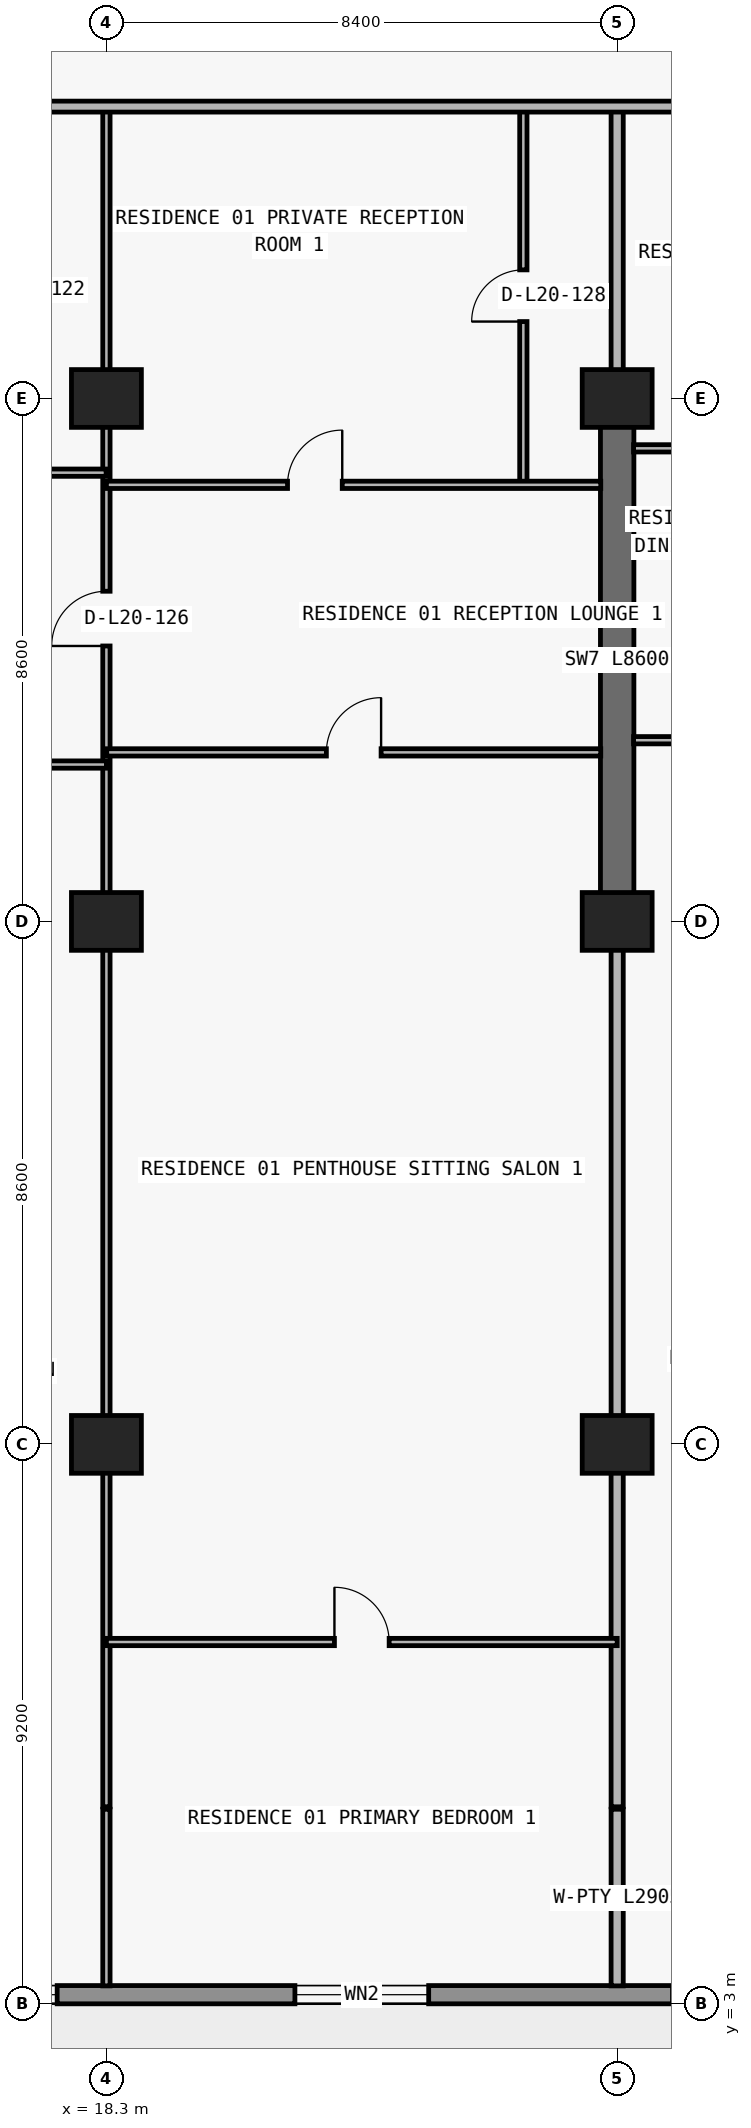
"""IFC4 building model, lengths in metres.
Left out: names, types, materials, properties, quantities, classifications, styles, units other than length and angle.
Written with IfcOpenShell. Run it as: python <this file> out.ifc"""

import sys

from ifc_helpers import new_model, si_unit, direction, frame, frame_2d, origin, origin_2d, place, context, subcontext, project, spatial, rectangle, extrude, element, fill, save


model = new_model("IFC4")
c1 = context("Model", 3, precision=1e-05, world=origin(), true_north=direction((0.0, 1.0)))
c2 = subcontext(c1, "Body", "Model", "MODEL_VIEW")
j1 = project(units=[si_unit("LENGTHUNIT", "METRE"), si_unit("PLANEANGLEUNIT", "RADIAN")], contexts=[c1])
p1 = place(None, origin())
s1 = spatial("IfcSite", under=j1, at=p1, CompositionType="ELEMENT")
p2 = place(p1, origin())
s2 = spatial("IfcBuilding", under=s1, at=p2, CompositionType="ELEMENT")
p3 = place(p2, frame((0.0, 0.0, 76.2)))
s3 = spatial("IfcBuildingStorey", under=s2, at=p3, CompositionType="ELEMENT", Elevation=76.2)
for number, where, z_axis, x_axis in (
    (1, (18.3, 12.2, 0.0), (0.0, 0.0, 1.0), (1.0, 0.0, 0.0)),
    (2, (26.7, 12.2, 0.0), (0.0, 0.0, 1.0), (1.0, 0.0, 0.0)),
    (3, (18.3, 20.8, 0.0), (0.0, 0.0, 1.0), (1.0, 0.0, 0.0)),
    (4, (26.7, 20.8, 0.0), (0.0, 0.0, 1.0), (1.0, 0.0, 0.0)),
    (5, (18.3, 29.4, 0.0), (0.0, 0.0, 1.0), (1.0, 0.0, 0.0)),
    (6, (26.7, 29.4, 0.0), (0.0, 0.0, 1.0), (1.0, 0.0, 0.0)),
):
    element("IfcColumn", number, at=place(p3, frame(where, z_axis=z_axis, x_axis=x_axis)), inside=s3, PredefinedType="COLUMN", context=c2, shape_type="SweptSolid", body=[
        extrude(rectangle(XDim=1.15, YDim=0.95, at=origin_2d()), origin(), (0.0, 0.0, 1.0), 3.0),
    ])
p4 = place(p3, frame((26.7, 20.8, 0.0), z_axis=(0.0, 0.0, 1.0), x_axis=(0.0, 1.0, 0.0)))
e7 = element("IfcWall", 7, at=p4, inside=s3, PredefinedType="SHEAR", context=c2, shape_type="SweptSolid", body=[
    extrude(rectangle(XDim=8.6, YDim=0.55, at=frame_2d((4.3, 0.0))), origin(), (0.0, 0.0, 1.0), 3.0),
])
p5 = place(p3, frame((72.7, 3.15, 0.0), z_axis=(0.0, 0.0, 1.0), x_axis=(-1.0, 0.0, 0.0)))
e8 = element("IfcWall", 8, at=p5, inside=s3, PredefinedType="STANDARD", context=c2, shape_type="SweptSolid", body=[
    extrude(rectangle(XDim=67.6, YDim=0.3, at=frame_2d((33.8, 0.0))), origin(), (0.0, 0.0, 1.0), 3.0),
])
p6 = place(p5, frame((59.89, 0.0, 0.0)))
e9 = element("IfcOpeningElement", 9, at=p6, cuts=e8, PredefinedType="OPENING", context=c2, shape_type="SweptSolid", body=[
    extrude(rectangle(XDim=2.0, YDim=2.3, at=frame_2d((1.0, 1.15))), frame((0.0, 0.16, 0.0), z_axis=(0.0, -1.0, 0.0), x_axis=(1.0, 0.0, 0.0)), (0.0, 0.0, 1.0), 0.32),
])
p7 = place(p5, frame((55.21, 0.0, 0.65)))
e10 = element("IfcOpeningElement", 10, at=p7, cuts=e8, PredefinedType="OPENING", context=c2, shape_type="SweptSolid", body=[
    extrude(rectangle(XDim=2.6, YDim=1.85, at=frame_2d((1.3, 0.925))), frame((0.0, 0.16, 0.0), z_axis=(0.0, -1.0, 0.0), x_axis=(1.0, 0.0, 0.0)), (0.0, 0.0, 1.0), 0.32),
])
p8 = place(p5, frame((49.1, 0.0, 0.85)))
e11 = element("IfcOpeningElement", 11, at=p8, cuts=e8, PredefinedType="OPENING", context=c2, shape_type="SweptSolid", body=[
    extrude(rectangle(XDim=2.2, YDim=1.55, at=frame_2d((1.1, 0.775))), frame((0.0, 0.16, 0.0), z_axis=(0.0, -1.0, 0.0), x_axis=(1.0, 0.0, 0.0)), (0.0, 0.0, 1.0), 0.32),
])
p9 = place(p5, frame((43.09, 0.0, 0.0)))
e12 = element("IfcOpeningElement", 12, at=p9, cuts=e8, PredefinedType="OPENING", context=c2, shape_type="SweptSolid", body=[
    extrude(rectangle(XDim=2.0, YDim=2.3, at=frame_2d((1.0, 1.15))), frame((0.0, 0.16, 0.0), z_axis=(0.0, -1.0, 0.0), x_axis=(1.0, 0.0, 0.0)), (0.0, 0.0, 1.0), 0.32),
])
p10 = place(p5, frame((38.41, 0.0, 0.65)))
e13 = element("IfcOpeningElement", 13, at=p10, cuts=e8, PredefinedType="OPENING", context=c2, shape_type="SweptSolid", body=[
    extrude(rectangle(XDim=2.6, YDim=1.85, at=frame_2d((1.3, 0.925))), frame((0.0, 0.16, 0.0), z_axis=(0.0, -1.0, 0.0), x_axis=(1.0, 0.0, 0.0)), (0.0, 0.0, 1.0), 0.32),
])
p11 = place(p5, frame((32.7, 0.0, 0.85)))
e14 = element("IfcOpeningElement", 14, at=p11, cuts=e8, PredefinedType="OPENING", context=c2, shape_type="SweptSolid", body=[
    extrude(rectangle(XDim=2.2, YDim=1.55, at=frame_2d((1.1, 0.775))), frame((0.0, 0.16, 0.0), z_axis=(0.0, -1.0, 0.0), x_axis=(1.0, 0.0, 0.0)), (0.0, 0.0, 1.0), 0.32),
])
p12 = place(p5, frame((24.7, 0.0, 0.85)))
e15 = element("IfcOpeningElement", 15, at=p12, cuts=e8, PredefinedType="OPENING", context=c2, shape_type="SweptSolid", body=[
    extrude(rectangle(XDim=2.2, YDim=1.55, at=frame_2d((1.1, 0.775))), frame((0.0, 0.16, 0.0), z_axis=(0.0, -1.0, 0.0), x_axis=(1.0, 0.0, 0.0)), (0.0, 0.0, 1.0), 0.32),
])
p13 = place(p5, frame((18.69, 0.0, 0.0)))
e16 = element("IfcOpeningElement", 16, at=p13, cuts=e8, PredefinedType="OPENING", context=c2, shape_type="SweptSolid", body=[
    extrude(rectangle(XDim=2.0, YDim=2.3, at=frame_2d((1.0, 1.15))), frame((0.0, 0.16, 0.0), z_axis=(0.0, -1.0, 0.0), x_axis=(1.0, 0.0, 0.0)), (0.0, 0.0, 1.0), 0.32),
])
p14 = place(p5, frame((14.01, 0.0, 0.65)))
e17 = element("IfcOpeningElement", 17, at=p14, cuts=e8, PredefinedType="OPENING", context=c2, shape_type="SweptSolid", body=[
    extrude(rectangle(XDim=2.6, YDim=1.85, at=frame_2d((1.3, 0.925))), frame((0.0, 0.16, 0.0), z_axis=(0.0, -1.0, 0.0), x_axis=(1.0, 0.0, 0.0)), (0.0, 0.0, 1.0), 0.32),
])
p15 = place(p5, frame((7.9, 0.0, 0.85)))
e18 = element("IfcOpeningElement", 18, at=p15, cuts=e8, PredefinedType="OPENING", context=c2, shape_type="SweptSolid", body=[
    extrude(rectangle(XDim=2.2, YDim=1.55, at=frame_2d((1.1, 0.775))), frame((0.0, 0.16, 0.0), z_axis=(0.0, -1.0, 0.0), x_axis=(1.0, 0.0, 0.0)), (0.0, 0.0, 1.0), 0.32),
])
p16 = place(p3, frame((18.3, 3.295, 0.0), z_axis=(0.0, 0.0, 1.0), x_axis=(0.0, 1.0, 0.0)))
e19 = element("IfcWall", 19, at=p16, inside=s3, PredefinedType="PARTITIONING", context=c2, shape_type="SweptSolid", body=[
    extrude(rectangle(XDim=2.905, YDim=0.12, at=frame_2d((1.453, 0.0))), origin(), (0.0, 0.0, 1.0), 3.0),
])
p17 = place(p3, frame((18.3, 6.24, 0.0), z_axis=(0.0, 0.0, 1.0), x_axis=(0.0, 1.0, 0.0)))
e20 = element("IfcWall", 20, at=p17, inside=s3, PredefinedType="PARTITIONING", context=c2, shape_type="SweptSolid", body=[
    extrude(rectangle(XDim=27.96, YDim=0.12, at=frame_2d((13.98, 0.0))), origin(), (0.0, 0.0, 1.0), 2.06),
])
p18 = place(p17, frame((19.09, 0.0, 0.0)))
e21 = element("IfcOpeningElement", 21, at=p18, cuts=e20, PredefinedType="OPENING", context=c2, shape_type="SweptSolid", body=[
    extrude(rectangle(XDim=0.9, YDim=2.01, at=frame_2d((0.45, 1.005))), frame((0.0, 0.07, 0.0), z_axis=(0.0, -1.0, 0.0), x_axis=(1.0, 0.0, 0.0)), (0.0, 0.0, 1.0), 0.14),
])
p19 = place(p3, frame((25.157, 27.98, 0.0), z_axis=(0.0, 0.0, 1.0), x_axis=(0.0, 1.0, 0.0)))
e22 = element("IfcWall", 22, at=p19, inside=s3, PredefinedType="PARTITIONING", context=c2, shape_type="SweptSolid", body=[
    extrude(rectangle(XDim=6.22, YDim=0.12, at=frame_2d((3.11, 0.0))), origin(), (0.0, 0.0, 1.0), 3.0),
])
p20 = place(p19, frame((2.685, 0.0, 0.0)))
e23 = element("IfcOpeningElement", 23, at=p20, cuts=e22, PredefinedType="OPENING", context=c2, shape_type="SweptSolid", body=[
    extrude(rectangle(XDim=0.85, YDim=2.1, at=frame_2d((0.425, 1.05))), frame((0.0, 0.07, 0.0), z_axis=(0.0, -1.0, 0.0), x_axis=(1.0, 0.0, 0.0)), (0.0, 0.0, 1.0), 0.14),
])
p21 = place(p3, frame((26.7, 3.295, 0.0), z_axis=(0.0, 0.0, 1.0), x_axis=(0.0, 1.0, 0.0)))
e24 = element("IfcWall", 24, at=p21, inside=s3, PredefinedType="PARTITIONING", context=c2, shape_type="SweptSolid", body=[
    extrude(rectangle(XDim=2.905, YDim=0.2, at=frame_2d((1.453, 0.0))), origin(), (0.0, 0.0, 1.0), 3.0),
])
p22 = place(p3, frame((26.7, 6.24, 0.0), z_axis=(0.0, 0.0, 1.0), x_axis=(0.0, 1.0, 0.0)))
e25 = element("IfcWall", 25, at=p22, inside=s3, PredefinedType="PARTITIONING", context=c2, shape_type="SweptSolid", body=[
    extrude(rectangle(XDim=14.555, YDim=0.2, at=frame_2d((7.277, 0.0))), origin(), (0.0, 0.0, 1.0), 2.06),
])
p23 = place(p3, frame((26.7, 29.405, 0.0), z_axis=(0.0, 0.0, 1.0), x_axis=(0.0, 1.0, 0.0)))
e26 = element("IfcWall", 26, at=p23, inside=s3, PredefinedType="PARTITIONING", context=c2, shape_type="SweptSolid", body=[
    extrude(rectangle(XDim=4.795, YDim=0.2, at=frame_2d((2.397, 0.0))), origin(), (0.0, 0.0, 1.0), 2.285),
])
p24 = place(p3, frame((18.3, 8.95, 0.0), z_axis=(0.0, 0.0, 1.0), x_axis=(1.0, 0.0, 0.0)))
e27 = element("IfcWall", 27, at=p24, inside=s3, PredefinedType="PARTITIONING", context=c2, shape_type="SweptSolid", body=[
    extrude(rectangle(XDim=8.4, YDim=0.12, at=frame_2d((4.2, 0.0))), origin(), (0.0, 0.0, 1.0), 3.0),
])
p25 = place(p24, frame((3.75, 0.0, 0.0)))
e28 = element("IfcOpeningElement", 28, at=p25, cuts=e27, PredefinedType="OPENING", context=c2, shape_type="SweptSolid", body=[
    extrude(rectangle(XDim=0.9, YDim=2.15, at=frame_2d((0.45, 1.075))), frame((0.0, 0.07, 0.0), z_axis=(0.0, -1.0, 0.0), x_axis=(1.0, 0.0, 0.0)), (0.0, 0.0, 1.0), 0.14),
])
p26 = place(p3, frame((9.9, 23.38, 0.0), z_axis=(0.0, 0.0, 1.0), x_axis=(1.0, 0.0, 0.0)))
e29 = element("IfcWall", 29, at=p26, inside=s3, PredefinedType="PARTITIONING", context=c2, shape_type="SweptSolid", body=[
    extrude(rectangle(XDim=8.4, YDim=0.12, at=frame_2d((4.2, 0.0))), origin(), (0.0, 0.0, 1.0), 3.0),
])
p27 = place(p26, frame((1.44, 0.0, 0.0)))
e30 = element("IfcOpeningElement", 30, at=p27, cuts=e29, PredefinedType="OPENING", context=c2, shape_type="SweptSolid", body=[
    extrude(rectangle(XDim=0.9, YDim=2.15, at=frame_2d((0.45, 1.075))), frame((0.0, 0.07, 0.0), z_axis=(0.0, -1.0, 0.0), x_axis=(1.0, 0.0, 0.0)), (0.0, 0.0, 1.0), 0.14),
])
p28 = place(p3, frame((18.305, 23.58, 0.0), z_axis=(0.0, 0.0, 1.0), x_axis=(1.0, 0.0, 0.0)))
e31 = element("IfcWall", 31, at=p28, inside=s3, PredefinedType="PARTITIONING", context=c2, shape_type="SweptSolid", body=[
    extrude(rectangle(XDim=8.125, YDim=0.12, at=frame_2d((4.062, 0.0))), origin(), (0.0, 0.0, 1.0), 3.0),
])
p29 = place(p28, frame((3.613, 0.0, 0.0)))
e32 = element("IfcOpeningElement", 32, at=p29, cuts=e31, PredefinedType="OPENING", context=c2, shape_type="SweptSolid", body=[
    extrude(rectangle(XDim=0.9, YDim=2.15, at=frame_2d((0.45, 1.075))), frame((0.0, 0.07, 0.0), z_axis=(0.0, -1.0, 0.0), x_axis=(1.0, 0.0, 0.0)), (0.0, 0.0, 1.0), 0.14),
])
p30 = place(p3, frame((26.97, 23.78, 0.0), z_axis=(0.0, 0.0, 1.0), x_axis=(1.0, 0.0, 0.0)))
e33 = element("IfcWall", 33, at=p30, inside=s3, PredefinedType="PARTITIONING", context=c2, shape_type="SweptSolid", body=[
    extrude(rectangle(XDim=8.13, YDim=0.12, at=frame_2d((4.065, 0.0))), origin(), (0.0, 0.0, 1.0), 3.0),
])
p31 = place(p30, frame((1.179, 0.0, 0.0)))
e34 = element("IfcOpeningElement", 34, at=p31, cuts=e33, PredefinedType="OPENING", context=c2, shape_type="SweptSolid", body=[
    extrude(rectangle(XDim=0.9, YDim=2.15, at=frame_2d((0.45, 1.075))), frame((0.0, 0.07, 0.0), z_axis=(0.0, -1.0, 0.0), x_axis=(1.0, 0.0, 0.0)), (0.0, 0.0, 1.0), 0.14),
])
p32 = place(p3, frame((18.3, 27.98, 0.0), z_axis=(0.0, 0.0, 1.0), x_axis=(1.0, 0.0, 0.0)))
e35 = element("IfcWall", 35, at=p32, inside=s3, PredefinedType="PARTITIONING", context=c2, shape_type="SweptSolid", body=[
    extrude(rectangle(XDim=8.13, YDim=0.12, at=frame_2d((4.065, 0.0))), origin(), (0.0, 0.0, 1.0), 3.0),
])
p33 = place(p32, frame((2.979, 0.0, 0.0)))
e36 = element("IfcOpeningElement", 36, at=p33, cuts=e35, PredefinedType="OPENING", context=c2, shape_type="SweptSolid", body=[
    extrude(rectangle(XDim=0.9, YDim=2.15, at=frame_2d((0.45, 1.075))), frame((0.0, 0.07, 0.0), z_axis=(0.0, -1.0, 0.0), x_axis=(1.0, 0.0, 0.0)), (0.0, 0.0, 1.0), 0.14),
])
p34 = place(p3, frame((9.9, 28.18, 0.0), z_axis=(0.0, 0.0, 1.0), x_axis=(1.0, 0.0, 0.0)))
e37 = element("IfcWall", 37, at=p34, inside=s3, PredefinedType="PARTITIONING", context=c2, shape_type="SweptSolid", body=[
    extrude(rectangle(XDim=8.395, YDim=0.12, at=frame_2d((4.198, 0.0))), origin(), (0.0, 0.0, 1.0), 3.0),
])
p35 = place(p34, frame((1.44, 0.0, 0.0)))
e38 = element("IfcOpeningElement", 38, at=p35, cuts=e37, PredefinedType="OPENING", context=c2, shape_type="SweptSolid", body=[
    extrude(rectangle(XDim=0.9, YDim=2.15, at=frame_2d((0.45, 1.075))), frame((0.0, 0.07, 0.0), z_axis=(0.0, -1.0, 0.0), x_axis=(1.0, 0.0, 0.0)), (0.0, 0.0, 1.0), 0.14),
])
p36 = place(p3, frame((26.97, 28.58, 0.0), z_axis=(0.0, 0.0, 1.0), x_axis=(1.0, 0.0, 0.0)))
e39 = element("IfcWall", 39, at=p36, inside=s3, PredefinedType="PARTITIONING", context=c2, shape_type="SweptSolid", body=[
    extrude(rectangle(XDim=8.125, YDim=0.12, at=frame_2d((4.062, 0.0))), origin(), (0.0, 0.0, 1.0), 3.0),
])
p37 = place(p36, frame((1.179, 0.0, 0.0)))
e40 = element("IfcOpeningElement", 40, at=p37, cuts=e39, PredefinedType="OPENING", context=c2, shape_type="SweptSolid", body=[
    extrude(rectangle(XDim=0.9, YDim=2.15, at=frame_2d((0.45, 1.075))), frame((0.0, 0.07, 0.0), z_axis=(0.0, -1.0, 0.0), x_axis=(1.0, 0.0, 0.0)), (0.0, 0.0, 1.0), 0.14),
])
p38 = place(p3, frame((5.105, 34.2, 0.0), z_axis=(0.0, 0.0, 1.0), x_axis=(1.0, 0.0, 0.0)))
e41 = element("IfcWall", 41, at=p38, inside=s3, PredefinedType="PARTITIONING", context=c2, shape_type="SweptSolid", body=[
    extrude(rectangle(XDim=67.595, YDim=0.18, at=frame_2d((33.797, 0.0))), origin(), (0.0, 0.0, 1.0), 3.0),
])
p39 = place(p38, frame((7.639, 0.0, 0.0)))
e42 = element("IfcOpeningElement", 42, at=p39, cuts=e41, PredefinedType="OPENING", context=c2, shape_type="SweptSolid", body=[
    extrude(rectangle(XDim=1.0, YDim=2.2, at=frame_2d((0.5, 1.1))), frame((0.0, 0.1, 0.0), z_axis=(0.0, -1.0, 0.0), x_axis=(1.0, 0.0, 0.0)), (0.0, 0.0, 1.0), 0.2),
])
p40 = place(p38, frame((24.423, 0.0, 0.0)))
e43 = element("IfcOpeningElement", 43, at=p40, cuts=e41, PredefinedType="OPENING", context=c2, shape_type="SweptSolid", body=[
    extrude(rectangle(XDim=1.0, YDim=2.2, at=frame_2d((0.5, 1.1))), frame((0.0, 0.1, 0.0), z_axis=(0.0, -1.0, 0.0), x_axis=(1.0, 0.0, 0.0)), (0.0, 0.0, 1.0), 0.2),
])
p41 = place(p38, frame((48.825, 0.0, 0.0)))
e44 = element("IfcOpeningElement", 44, at=p41, cuts=e41, PredefinedType="OPENING", context=c2, shape_type="SweptSolid", body=[
    extrude(rectangle(XDim=1.0, YDim=2.2, at=frame_2d((0.5, 1.1))), frame((0.0, 0.1, 0.0), z_axis=(0.0, -1.0, 0.0), x_axis=(1.0, 0.0, 0.0)), (0.0, 0.0, 1.0), 0.2),
])
p42 = place(p7, origin())
e45 = element("IfcWindow", 45, at=p42, inside=s3, PartitioningType="SINGLE_PANEL", PredefinedType="WINDOW", context=c2, shape_type="SweptSolid", body=[
    extrude(rectangle(XDim=2.6, YDim=1.85, at=frame_2d((1.3, 0.925))), frame((0.0, 0.03, 0.0), z_axis=(0.0, -1.0, 0.0), x_axis=(1.0, 0.0, 0.0)), (0.0, 0.0, 1.0), 0.06),
])
fill(e10, e45)
p43 = place(p8, origin())
e46 = element("IfcWindow", 46, at=p43, inside=s3, PartitioningType="SINGLE_PANEL", PredefinedType="WINDOW", context=c2, shape_type="SweptSolid", body=[
    extrude(rectangle(XDim=2.2, YDim=1.55, at=frame_2d((1.1, 0.775))), frame((0.0, 0.03, 0.0), z_axis=(0.0, -1.0, 0.0), x_axis=(1.0, 0.0, 0.0)), (0.0, 0.0, 1.0), 0.06),
])
fill(e11, e46)
p44 = place(p18, origin())
e47 = element("IfcDoor", 47, at=p44, inside=s3, OperationType="SINGLE_SWING_LEFT", PredefinedType="DOOR", context=c2, shape_type="SweptSolid", body=[
    extrude(rectangle(XDim=0.9, YDim=2.01, at=frame_2d((0.45, 1.005))), frame((0.0, 0.025, 0.0), z_axis=(0.0, -1.0, 0.0), x_axis=(1.0, 0.0, 0.0)), (0.0, 0.0, 1.0), 0.05),
])
fill(e21, e47)
p45 = place(p33, origin())
e48 = element("IfcDoor", 48, at=p45, inside=s3, OperationType="SINGLE_SWING_RIGHT", PredefinedType="DOOR", context=c2, shape_type="SweptSolid", body=[
    extrude(rectangle(XDim=0.9, YDim=2.15, at=frame_2d((0.45, 1.075))), frame((0.0, 0.025, 0.0), z_axis=(0.0, -1.0, 0.0), x_axis=(1.0, 0.0, 0.0)), (0.0, 0.0, 1.0), 0.05),
])
fill(e36, e48)
p46 = place(p20, origin())
e49 = element("IfcDoor", 49, at=p46, inside=s3, OperationType="SINGLE_SWING_LEFT", PredefinedType="DOOR", context=c2, shape_type="SweptSolid", body=[
    extrude(rectangle(XDim=0.85, YDim=2.1, at=frame_2d((0.425, 1.05))), frame((0.0, 0.025, 0.0), z_axis=(0.0, -1.0, 0.0), x_axis=(1.0, 0.0, 0.0)), (0.0, 0.0, 1.0), 0.05),
])
fill(e23, e49)
p47 = place(p29, origin())
e50 = element("IfcDoor", 50, at=p47, inside=s3, OperationType="SINGLE_SWING_RIGHT", PredefinedType="DOOR", context=c2, shape_type="SweptSolid", body=[
    extrude(rectangle(XDim=0.9, YDim=2.15, at=frame_2d((0.45, 1.075))), frame((0.0, 0.025, 0.0), z_axis=(0.0, -1.0, 0.0), x_axis=(1.0, 0.0, 0.0)), (0.0, 0.0, 1.0), 0.05),
])
fill(e32, e50)
p48 = place(p25, origin())
e51 = element("IfcDoor", 51, at=p48, inside=s3, OperationType="SINGLE_SWING_LEFT", PredefinedType="DOOR", context=c2, shape_type="SweptSolid", body=[
    extrude(rectangle(XDim=0.9, YDim=2.15, at=frame_2d((0.45, 1.075))), frame((0.0, 0.025, 0.0), z_axis=(0.0, -1.0, 0.0), x_axis=(1.0, 0.0, 0.0)), (0.0, 0.0, 1.0), 0.05),
])
fill(e28, e51)
save(model, sys.argv[1])
